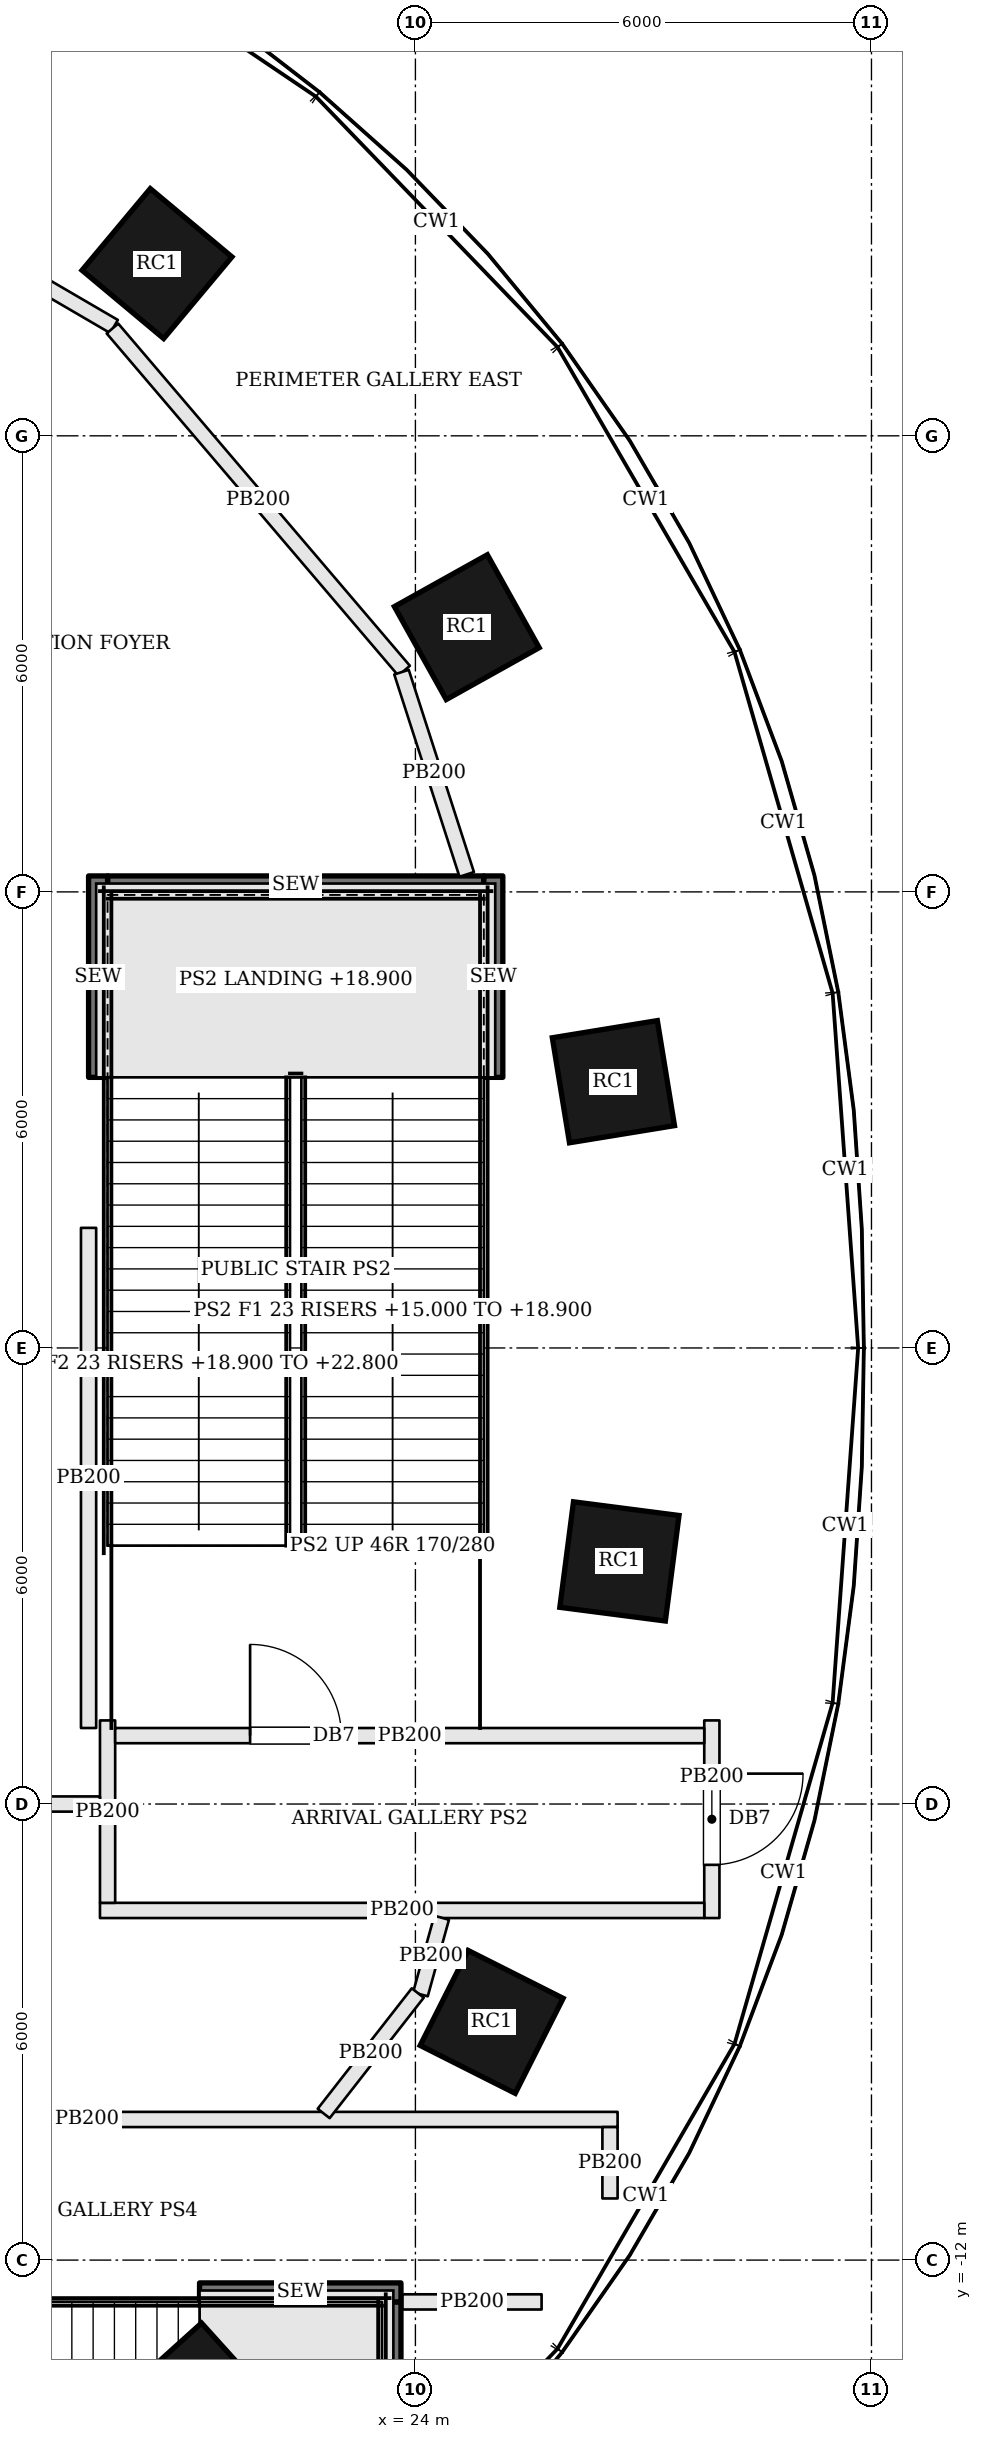
"""IFC4 building model, lengths in metres.
Left out: names, types, materials, properties, quantities, classifications, styles, units other than length and angle.
Written with IfcOpenShell. Run it as: python <this file> out.ifc"""

import sys

from ifc_helpers import new_model, si_unit, direction, frame, frame_2d, origin, origin_2d, place, context, subcontext, project, spatial, rectangle, extrude, element, fill, save


model = new_model("IFC4")
c1 = context("Model", 3, precision=1e-05, world=origin(), true_north=direction((0.0, 1.0)))
c2 = subcontext(c1, "Body", "Model", "MODEL_VIEW")
j1 = project(units=[si_unit("LENGTHUNIT", "METRE"), si_unit("PLANEANGLEUNIT", "RADIAN")], contexts=[c1])
p1 = place(None, origin())
s1 = spatial("IfcSite", under=j1, at=p1, CompositionType="ELEMENT")
p2 = place(p1, origin())
s2 = spatial("IfcBuilding", under=s1, at=p2, CompositionType="ELEMENT")
p3 = place(p2, frame((0.0, 0.0, 15.0)))
s3 = spatial("IfcBuildingStorey", under=s2, at=p3, CompositionType="ELEMENT", Elevation=15.0)
for number, where, z_axis, x_axis in (
    (1, (26.605, 3.503, 0.0), (0.0, 0.0, 1.0), (-0.161, 0.987, 0.0)),
    (2, (24.676, 9.483, 0.0), (0.0, 0.0, 1.0), (-0.487, 0.873, 0.0)),
    (3, (20.6, 14.266, 0.0), (0.0, 0.0, 1.0), (-0.767, 0.641, 0.0)),
    (4, (21.135, -13.817, 0.0), (0.0, 0.0, 1.0), (0.743, 0.67, 0.0)),
    (5, (25.003, -8.866, 0.0), (0.0, 0.0, 1.0), (0.45, 0.893, 0.0)),
    (6, (26.684, -2.808, 0.0), (0.0, 0.0, 1.0), (0.128, 0.992, 0.0)),
):
    element("IfcColumn", number, at=place(p3, frame(where, z_axis=z_axis, x_axis=x_axis)), inside=s3, PredefinedType="COLUMN", context=c2, shape_type="SweptSolid", body=[
        extrude(rectangle(XDim=1.4, YDim=1.4, at=origin_2d()), origin(), (0.0, 0.0, 1.0), 7.8),
    ])
p4 = place(p3, frame((27.9, -4.9, 0.0), z_axis=(0.0, 0.0, 1.0), x_axis=(0.0, -1.0, 0.0)))
e7 = element("IfcWall", 7, at=p4, inside=s3, PredefinedType="PARTITIONING", context=c2, shape_type="SweptSolid", body=[
    extrude(rectangle(XDim=2.6, YDim=0.2, at=frame_2d((1.3, 0.0))), origin(), (0.0, 0.0, 1.0), 6.83),
])
p5 = place(p4, frame((0.7, 0.0, 0.0)))
e8 = element("IfcOpeningElement", 8, at=p5, cuts=e7, PredefinedType="OPENING", context=c2, shape_type="SweptSolid", body=[
    extrude(rectangle(XDim=1.2, YDim=2.1, at=frame_2d((0.6, 1.05))), frame((0.0, 0.11, 0.0), z_axis=(0.0, -1.0, 0.0), x_axis=(1.0, 0.0, 0.0)), (0.0, 0.0, 1.0), 0.22),
])
p6 = place(p3, frame((27.8, -7.4, 0.0), z_axis=(0.0, 0.0, 1.0), x_axis=(-1.0, 0.0, 0.0)))
e9 = element("IfcWall", 9, at=p6, inside=s3, PredefinedType="PARTITIONING", context=c2, shape_type="SweptSolid", body=[
    extrude(rectangle(XDim=7.95, YDim=0.2, at=frame_2d((3.975, 0.0))), origin(), (0.0, 0.0, 1.0), 6.83),
])
p7 = place(p3, frame((19.95, -7.3, 0.0), z_axis=(0.0, 0.0, 1.0), x_axis=(0.0, 1.0, 0.0)))
e10 = element("IfcWall", 10, at=p7, inside=s3, PredefinedType="PARTITIONING", context=c2, shape_type="SweptSolid", body=[
    extrude(rectangle(XDim=2.4, YDim=0.2, at=frame_2d((1.2, 0.0))), origin(), (0.0, 0.0, 1.0), 6.83),
])
p8 = place(p3, frame((20.05, -5.1, 0.0), z_axis=(0.0, 0.0, 1.0), x_axis=(1.0, 0.0, 0.0)))
e11 = element("IfcWall", 11, at=p8, inside=s3, PredefinedType="PARTITIONING", context=c2, shape_type="SweptSolid", body=[
    extrude(rectangle(XDim=7.75, YDim=0.2, at=frame_2d((3.875, 0.0))), origin(), (0.0, 0.0, 1.0), 6.83),
])
p9 = place(p8, frame((1.775, 0.0, 0.0)))
e12 = element("IfcOpeningElement", 12, at=p9, cuts=e11, PredefinedType="OPENING", context=c2, shape_type="SweptSolid", body=[
    extrude(rectangle(XDim=1.2, YDim=2.1, at=frame_2d((0.6, 1.05))), frame((0.0, 0.11, 0.0), z_axis=(0.0, -1.0, 0.0), x_axis=(1.0, 0.0, 0.0)), (0.0, 0.0, 1.0), 0.22),
])
p10 = place(p3, frame((25.66, -12.55, 0.0), z_axis=(0.0, 0.0, 1.0), x_axis=(-1.0, 0.0, 0.0)))
e13 = element("IfcWall", 13, at=p10, inside=s3, PredefinedType="PARTITIONING", context=c2, shape_type="SweptSolid", body=[
    extrude(rectangle(XDim=1.83, YDim=0.2, at=frame_2d((0.915, 0.0))), origin(), (0.0, 0.0, 1.0), 6.83),
])
p11 = place(p3, frame((12.7, -10.15, 0.0), z_axis=(0.0, 0.0, 1.0), x_axis=(1.0, 0.0, 0.0)))
e14 = element("IfcWall", 14, at=p11, inside=s3, PredefinedType="PARTITIONING", context=c2, shape_type="SweptSolid", body=[
    extrude(rectangle(XDim=13.96, YDim=0.2, at=frame_2d((6.98, 0.0))), origin(), (0.0, 0.0, 1.0), 6.83),
])
p12 = place(p3, frame((26.56, -10.25, 0.0), z_axis=(0.0, 0.0, 1.0), x_axis=(0.0, -1.0, 0.0)))
e15 = element("IfcWall", 15, at=p12, inside=s3, PredefinedType="PARTITIONING", context=c2, shape_type="SweptSolid", body=[
    extrude(rectangle(XDim=0.939, YDim=0.2, at=frame_2d((0.469, 0.0))), origin(), (0.0, 0.0, 1.0), 6.83),
])
p13 = place(p3, frame((-19.85, -6.0, 0.0), z_axis=(0.0, 0.0, 1.0), x_axis=(1.0, 0.0, 0.0)))
e16 = element("IfcWall", 16, at=p13, inside=s3, PredefinedType="PARTITIONING", context=c2, shape_type="SweptSolid", body=[
    extrude(rectangle(XDim=39.7, YDim=0.2, at=frame_2d((19.85, 0.0))), origin(), (0.0, 0.0, 1.0), 6.83),
])
p14 = place(p13, frame((13.172, 0.0, 0.0)))
e17 = element("IfcOpeningElement", 17, at=p14, cuts=e16, PredefinedType="OPENING", context=c2, shape_type="SweptSolid", body=[
    extrude(rectangle(XDim=1.2, YDim=2.1, at=frame_2d((0.6, 1.05))), frame((0.0, 0.11, 0.0), z_axis=(0.0, -1.0, 0.0), x_axis=(1.0, 0.0, 0.0)), (0.0, 0.0, 1.0), 0.22),
])
p15 = place(p13, frame((24.211, 0.0, 0.0)))
e18 = element("IfcOpeningElement", 18, at=p15, cuts=e16, PredefinedType="OPENING", context=c2, shape_type="SweptSolid", body=[
    extrude(rectangle(XDim=2.4, YDim=2.4, at=frame_2d((1.2, 1.2))), frame((0.0, 0.11, 0.0), z_axis=(0.0, -1.0, 0.0), x_axis=(1.0, 0.0, 0.0)), (0.0, 0.0, 1.0), 0.22),
])
p16 = place(p13, frame((7.011, 0.0, 0.0)))
e19 = element("IfcOpeningElement", 19, at=p16, cuts=e16, PredefinedType="OPENING", context=c2, shape_type="SweptSolid", body=[
    extrude(rectangle(XDim=2.4, YDim=2.4, at=frame_2d((1.2, 1.2))), frame((0.0, 0.11, 0.0), z_axis=(0.0, -1.0, 0.0), x_axis=(1.0, 0.0, 0.0)), (0.0, 0.0, 1.0), 0.22),
])
p17 = place(p3, frame((17.443, 14.95, 0.0), z_axis=(0.0, 0.0, 1.0), x_axis=(0.863767096464, -0.503891261153, 0.0)))
e20 = element("IfcWall", 20, at=p17, inside=s3, PredefinedType="PARTITIONING", context=c2, shape_type="SweptSolid", body=[
    extrude(rectangle(XDim=3.0, YDim=0.2, at=frame_2d((1.5, 0.0))), origin(), (0.0, 0.0, 1.0), 6.83),
])
p18 = place(p3, frame((20.014, 13.412, 0.0), z_axis=(0.0, 0.0, 1.0), x_axis=(0.648657765017, -0.761080221714, 0.0)))
e21 = element("IfcWall", 21, at=p18, inside=s3, PredefinedType="PARTITIONING", context=c2, shape_type="SweptSolid", body=[
    extrude(rectangle(XDim=5.916, YDim=0.2, at=frame_2d((2.958, 0.0))), origin(), (0.0, 0.0, 1.0), 6.83),
])
p19 = place(p3, frame((23.817, 8.891, 0.0), z_axis=(0.0, 0.0, 1.0), x_axis=(0.306913488124, -0.951737416942, 0.0)))
e22 = element("IfcWall", 22, at=p19, inside=s3, PredefinedType="PARTITIONING", context=c2, shape_type="SweptSolid", body=[
    extrude(rectangle(XDim=2.796, YDim=0.2, at=frame_2d((1.398, 0.0))), origin(), (0.0, 0.0, 1.0), 6.83),
])
p20 = place(p3, frame((19.7, 1.58, 0.0), z_axis=(0.0, 0.0, 1.0), x_axis=(0.0, -1.0, 0.0)))
e23 = element("IfcWall", 23, at=p20, inside=s3, PredefinedType="PARTITIONING", context=c2, shape_type="SweptSolid", body=[
    extrude(rectangle(XDim=6.58, YDim=0.2, at=frame_2d((3.29, 0.0))), origin(), (0.0, 0.0, 1.0), 6.83),
])
p21 = place(p3, frame((24.345, -7.496, 0.0), z_axis=(0.0, 0.0, 1.0), x_axis=(-0.267089429493, -0.963671747357, 0.0)))
e24 = element("IfcWall", 24, at=p21, inside=s3, PredefinedType="PARTITIONING", context=c2, shape_type="SweptSolid", body=[
    extrude(rectangle(XDim=1.045, YDim=0.2, at=frame_2d((0.522, 0.0))), origin(), (0.0, 0.0, 1.0), 6.83),
])
p22 = place(p3, frame((24.031, -8.486, 0.0), z_axis=(0.0, 0.0, 1.0), x_axis=(-0.615578080386, -0.788075901768, 0.0)))
e25 = element("IfcWall", 25, at=p22, inside=s3, PredefinedType="PARTITIONING", context=c2, shape_type="SweptSolid", body=[
    extrude(rectangle(XDim=2.011, YDim=0.2, at=frame_2d((1.006, 0.0))), origin(), (0.0, 0.0, 1.0), 6.83),
])
p23 = place(p3, frame((24.9, 6.085, 0.0), z_axis=(0.0, 0.0, 1.0), x_axis=(-1.0, 0.0, 0.0)))
e26 = element("IfcWall", 26, at=p23, inside=s3, PredefinedType="SOLIDWALL", context=c2, shape_type="SweptSolid", body=[
    extrude(rectangle(XDim=4.95, YDim=0.25, at=frame_2d((2.475, 0.0))), origin(), (0.0, 0.0, 1.0), 7.55),
])
for number, where, z_axis, x_axis in (
    (27, (19.825, 3.56, 0.0), (0.0, 0.0, 1.0), (0.0, 1.0, 0.0)),
    (28, (25.025, 3.56, 0.0), (0.0, 0.0, 1.0), (0.0, 1.0, 0.0)),
):
    element("IfcWall", number, at=place(p3, frame(where, z_axis=z_axis, x_axis=x_axis)), inside=s3, PredefinedType="SOLIDWALL", context=c2, shape_type="SweptSolid", body=[
        extrude(rectangle(XDim=2.65, YDim=0.25, at=frame_2d((1.325, 0.0))), origin(), (0.0, 0.0, 1.0), 7.55),
    ])
p24 = place(p3, frame((23.685, -17.5, 0.0), z_axis=(0.0, 0.0, 1.0), x_axis=(0.0, 1.0, 0.0)))
e29 = element("IfcWall", 29, at=p24, inside=s3, PredefinedType="SOLIDWALL", context=c2, shape_type="SweptSolid", body=[
    extrude(rectangle(XDim=4.95, YDim=0.25, at=frame_2d((2.475, 0.0))), origin(), (0.0, 0.0, 1.0), 7.55),
])
p25 = place(p3, frame((21.16, -12.425, 0.0), z_axis=(0.0, 0.0, 1.0), x_axis=(1.0, 0.0, 0.0)))
e30 = element("IfcWall", 30, at=p25, inside=s3, PredefinedType="SOLIDWALL", context=c2, shape_type="SweptSolid", body=[
    extrude(rectangle(XDim=2.65, YDim=0.25, at=frame_2d((1.325, 0.0))), origin(), (0.0, 0.0, 1.0), 7.55),
])
p26 = place(p9, origin())
e31 = element("IfcDoor", 31, at=p26, inside=s3, OperationType="SINGLE_SWING_LEFT", PredefinedType="DOOR", context=c2, shape_type="SweptSolid", body=[
    extrude(rectangle(XDim=1.2, YDim=2.1, at=frame_2d((0.6, 1.05))), frame((0.0, 0.025, 0.0), z_axis=(0.0, -1.0, 0.0), x_axis=(1.0, 0.0, 0.0)), (0.0, 0.0, 1.0), 0.05),
])
fill(e12, e31)
p27 = place(p5, origin())
e32 = element("IfcDoor", 32, at=p27, inside=s3, OperationType="SINGLE_SWING_LEFT", PredefinedType="DOOR", context=c2, shape_type="SweptSolid", body=[
    extrude(rectangle(XDim=1.2, YDim=2.1, at=frame_2d((0.6, 1.05))), frame((0.0, 0.025, 0.0), z_axis=(0.0, -1.0, 0.0), x_axis=(1.0, 0.0, 0.0)), (0.0, 0.0, 1.0), 0.05),
])
fill(e8, e32)
save(model, sys.argv[1])
